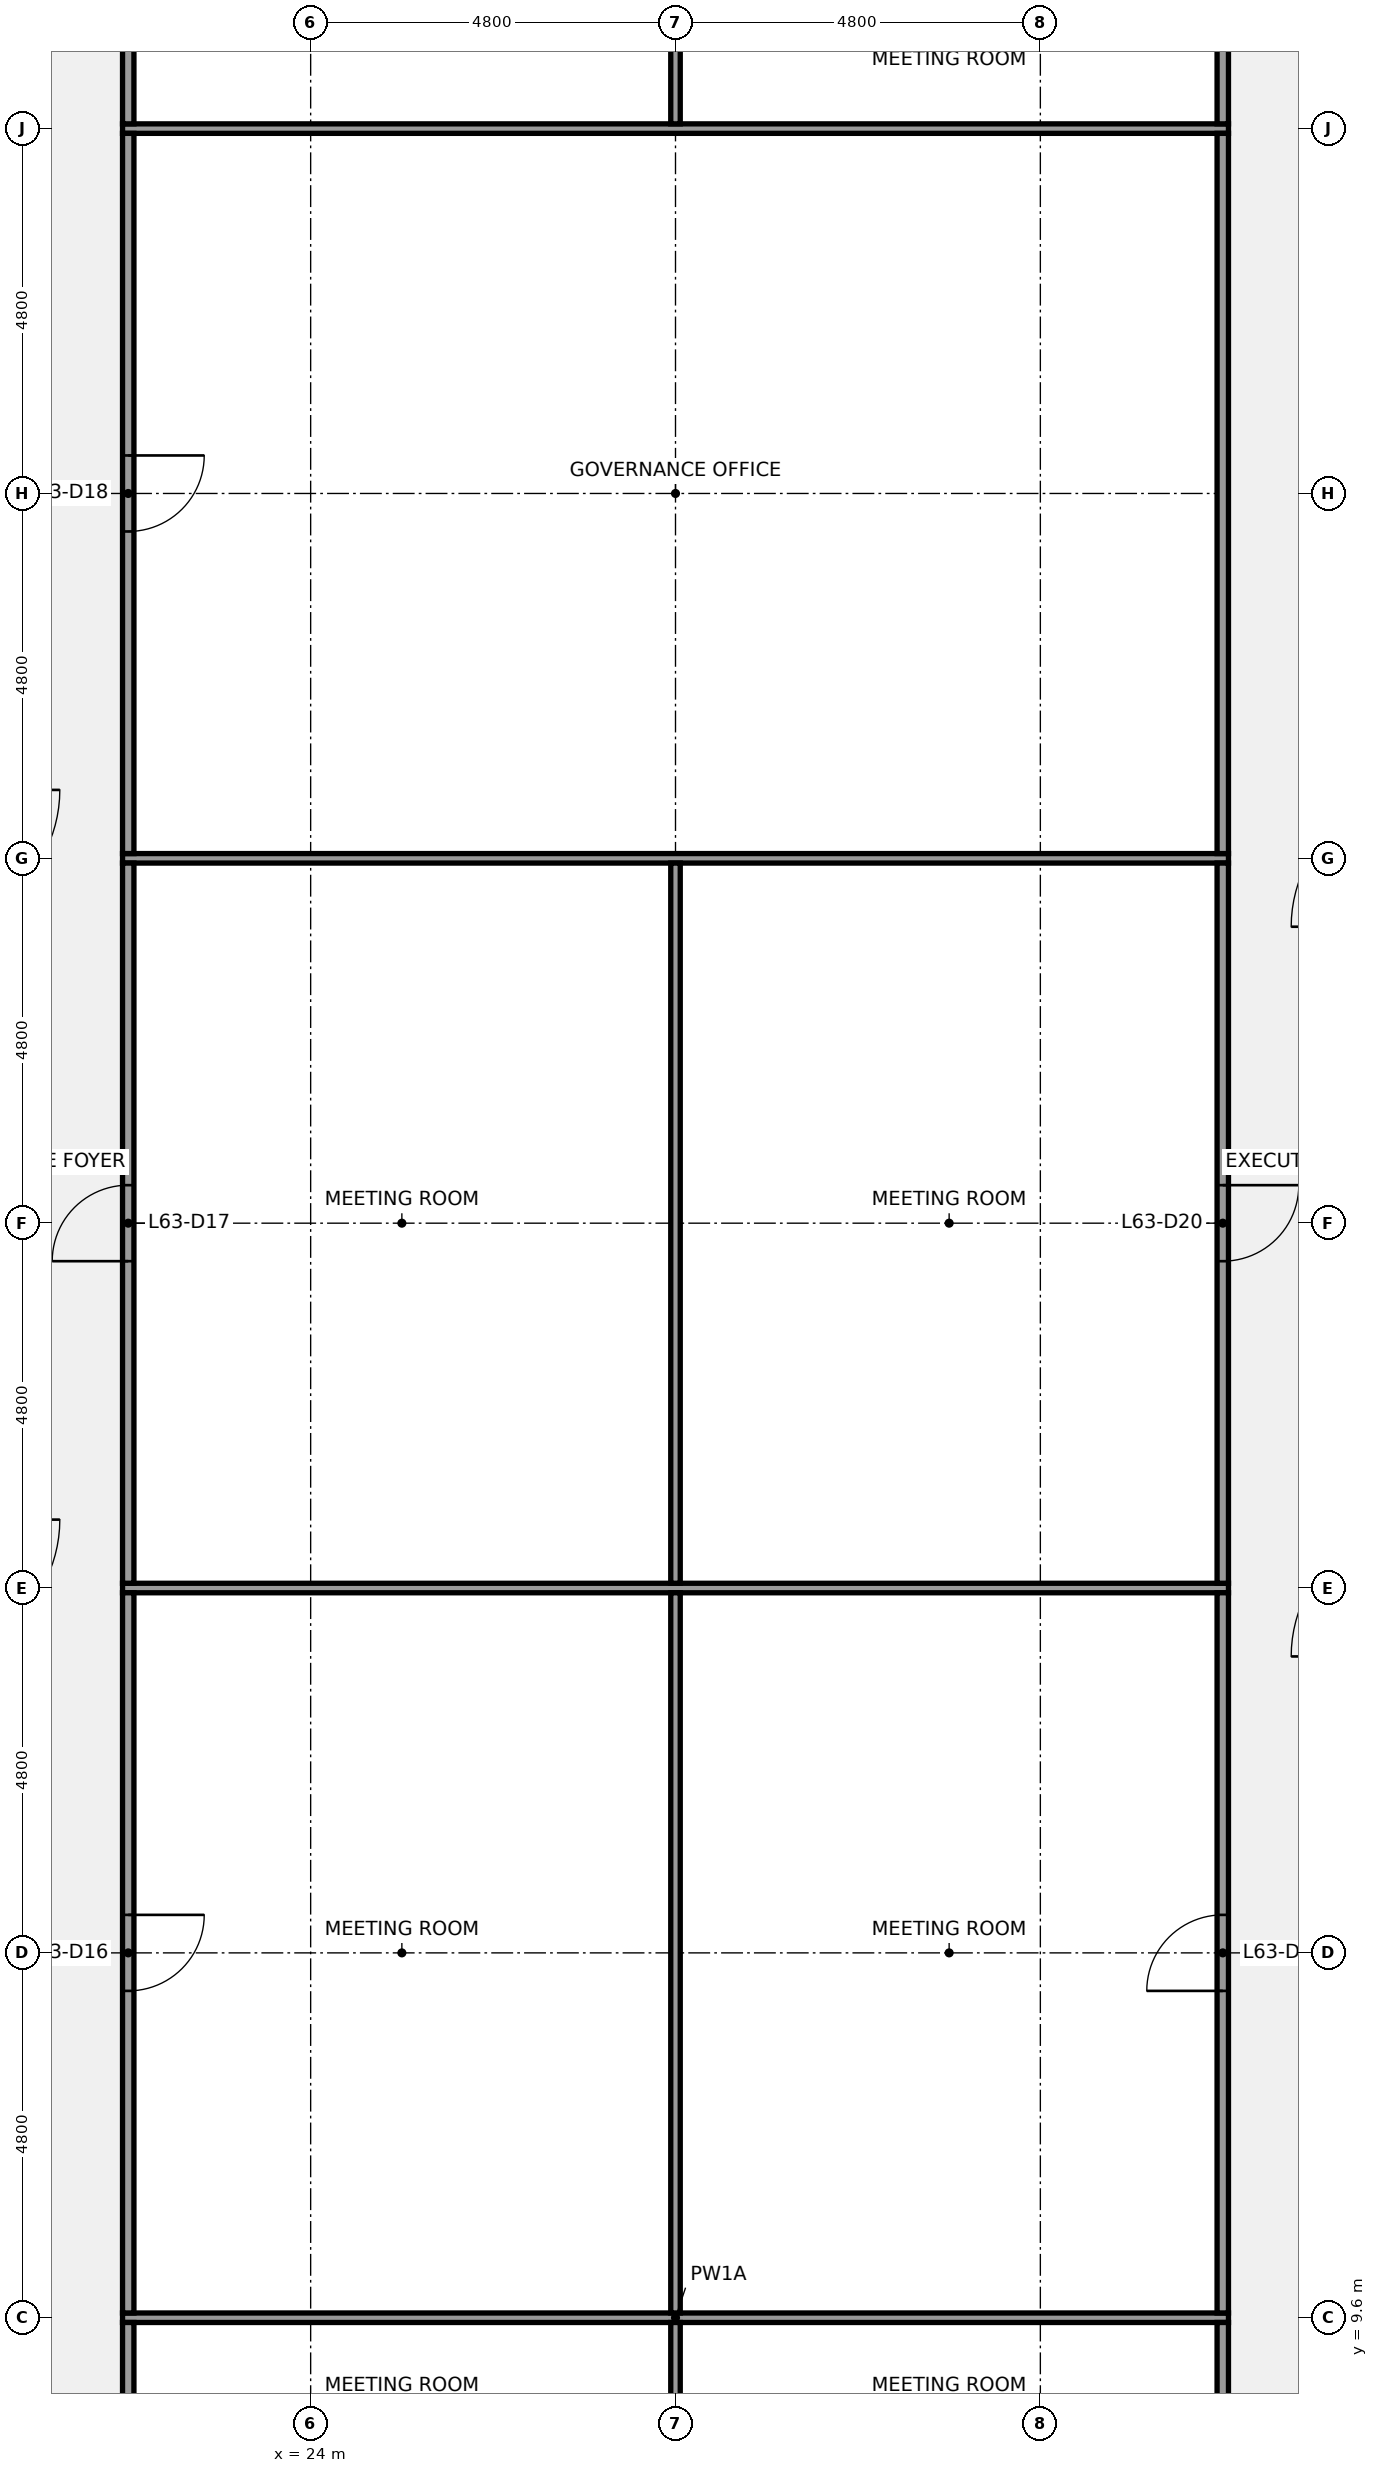
"""IFC4 building model, lengths in metres.
Left out: names, types, materials, properties, quantities, classifications, styles, units other than length and angle.
Written with IfcOpenShell. Run it as: python <this file> out.ifc"""

import sys

from ifc_helpers import new_model, si_unit, direction, frame, frame_2d, origin, place, context, subcontext, project, spatial, rectangle, extrude, element, fill, save


model = new_model("IFC4")
c1 = context("Model", 3, precision=1e-05, world=origin(), true_north=direction((0.0, 1.0)))
c2 = subcontext(c1, "Body", "Model", "MODEL_VIEW")
j1 = project(units=[si_unit("LENGTHUNIT", "METRE"), si_unit("PLANEANGLEUNIT", "RADIAN")], contexts=[c1])
p1 = place(None, origin())
s1 = spatial("IfcSite", under=j1, at=p1, CompositionType="ELEMENT")
p2 = place(p1, origin())
s2 = spatial("IfcBuilding", under=s1, at=p2, CompositionType="ELEMENT")
p3 = place(p2, frame((0.0, 0.0, 290.3)))
s3 = spatial("IfcBuildingStorey", under=s2, at=p3, CompositionType="ELEMENT", Elevation=290.3)
for number, where, z_axis, x_axis in (
    (1, (21.525, 9.6, 0.0), (0.0, 0.0, 1.0), (1.0, 0.0, 0.0)),
    (2, (21.525, 19.2, 0.0), (0.0, 0.0, 1.0), (1.0, 0.0, 0.0)),
    (3, (21.525, 28.8, 0.0), (0.0, 0.0, 1.0), (1.0, 0.0, 0.0)),
    (4, (21.525, 38.4, 0.0), (0.0, 0.0, 1.0), (1.0, 0.0, 0.0)),
):
    element("IfcWall", number, at=place(p3, frame(where, z_axis=z_axis, x_axis=x_axis)), inside=s3, PredefinedType="PARTITIONING", context=c2, shape_type="SweptSolid", body=[
        extrude(rectangle(XDim=14.55, YDim=0.125, at=frame_2d((7.275, 0.0))), origin(), (0.0, 0.0, 1.0), 2.87),
    ])
p4 = place(p3, frame((21.6, 7.275, 0.0), z_axis=(0.0, 0.0, 1.0), x_axis=(0.0, 1.0, 0.0)))
e5 = element("IfcWall", 5, at=p4, inside=s3, PredefinedType="PARTITIONING", context=c2, shape_type="SweptSolid", body=[
    extrude(rectangle(XDim=2.263, YDim=0.15, at=frame_2d((1.131, 0.0))), origin(), (0.0, 0.0, 1.0), 2.87),
])
p5 = place(p3, frame((21.6, 9.663, 0.0), z_axis=(0.0, 0.0, 1.0), x_axis=(0.0, 1.0, 0.0)))
e6 = element("IfcWall", 6, at=p5, inside=s3, PredefinedType="PARTITIONING", context=c2, shape_type="SweptSolid", body=[
    extrude(rectangle(XDim=9.475, YDim=0.15, at=frame_2d((4.737, 0.0))), origin(), (0.0, 0.0, 1.0), 2.87),
])
p6 = place(p5, frame((4.238, 0.0, 0.0)))
e7 = element("IfcOpeningElement", 7, at=p6, cuts=e6, PredefinedType="OPENING", context=c2, shape_type="SweptSolid", body=[
    extrude(rectangle(XDim=1.0, YDim=2.1, at=frame_2d((0.5, 1.05))), frame((0.0, 0.085, 0.0), z_axis=(0.0, -1.0, 0.0), x_axis=(1.0, 0.0, 0.0)), (0.0, 0.0, 1.0), 0.17),
])
p7 = place(p3, frame((21.6, 19.262, 0.0), z_axis=(0.0, 0.0, 1.0), x_axis=(0.0, 1.0, 0.0)))
e8 = element("IfcWall", 8, at=p7, inside=s3, PredefinedType="PARTITIONING", context=c2, shape_type="SweptSolid", body=[
    extrude(rectangle(XDim=9.475, YDim=0.15, at=frame_2d((4.738, 0.0))), origin(), (0.0, 0.0, 1.0), 2.87),
])
p8 = place(p7, frame((4.238, 0.0, 0.0)))
e9 = element("IfcOpeningElement", 9, at=p8, cuts=e8, PredefinedType="OPENING", context=c2, shape_type="SweptSolid", body=[
    extrude(rectangle(XDim=1.0, YDim=2.1, at=frame_2d((0.5, 1.05))), frame((0.0, 0.085, 0.0), z_axis=(0.0, -1.0, 0.0), x_axis=(1.0, 0.0, 0.0)), (0.0, 0.0, 1.0), 0.17),
])
p9 = place(p3, frame((21.6, 28.863, 0.0), z_axis=(0.0, 0.0, 1.0), x_axis=(0.0, 1.0, 0.0)))
e10 = element("IfcWall", 10, at=p9, inside=s3, PredefinedType="PARTITIONING", context=c2, shape_type="SweptSolid", body=[
    extrude(rectangle(XDim=9.475, YDim=0.15, at=frame_2d((4.737, 0.0))), origin(), (0.0, 0.0, 1.0), 2.87),
])
p10 = place(p9, frame((4.238, 0.0, 0.0)))
e11 = element("IfcOpeningElement", 11, at=p10, cuts=e10, PredefinedType="OPENING", context=c2, shape_type="SweptSolid", body=[
    extrude(rectangle(XDim=1.0, YDim=2.1, at=frame_2d((0.5, 1.05))), frame((0.0, 0.085, 0.0), z_axis=(0.0, -1.0, 0.0), x_axis=(1.0, 0.0, 0.0)), (0.0, 0.0, 1.0), 0.17),
])
p11 = place(p3, frame((21.6, 38.462, 0.0), z_axis=(0.0, 0.0, 1.0), x_axis=(0.0, 1.0, 0.0)))
e12 = element("IfcWall", 12, at=p11, inside=s3, PredefinedType="PARTITIONING", context=c2, shape_type="SweptSolid", body=[
    extrude(rectangle(XDim=2.263, YDim=0.15, at=frame_2d((1.131, 0.0))), origin(), (0.0, 0.0, 1.0), 2.87),
])
p12 = place(p3, frame((28.8, 7.275, 0.0), z_axis=(0.0, 0.0, 1.0), x_axis=(0.0, 1.0, 0.0)))
e13 = element("IfcWall", 13, at=p12, inside=s3, PredefinedType="PARTITIONING", context=c2, shape_type="SweptSolid", body=[
    extrude(rectangle(XDim=2.263, YDim=0.125, at=frame_2d((1.131, 0.0))), origin(), (0.0, 0.0, 1.0), 2.87),
])
p13 = place(p3, frame((28.8, 9.663, 0.0), z_axis=(0.0, 0.0, 1.0), x_axis=(0.0, 1.0, 0.0)))
e14 = element("IfcWall", 14, at=p13, inside=s3, PredefinedType="PARTITIONING", context=c2, shape_type="SweptSolid", body=[
    extrude(rectangle(XDim=9.475, YDim=0.125, at=frame_2d((4.737, 0.0))), origin(), (0.0, 0.0, 1.0), 2.87),
])
p14 = place(p3, frame((28.8, 19.262, 0.0), z_axis=(0.0, 0.0, 1.0), x_axis=(0.0, 1.0, 0.0)))
e15 = element("IfcWall", 15, at=p14, inside=s3, PredefinedType="PARTITIONING", context=c2, shape_type="SweptSolid", body=[
    extrude(rectangle(XDim=9.475, YDim=0.125, at=frame_2d((4.738, 0.0))), origin(), (0.0, 0.0, 1.0), 2.87),
])
p15 = place(p3, frame((28.8, 38.462, 0.0), z_axis=(0.0, 0.0, 1.0), x_axis=(0.0, 1.0, 0.0)))
e16 = element("IfcWall", 16, at=p15, inside=s3, PredefinedType="PARTITIONING", context=c2, shape_type="SweptSolid", body=[
    extrude(rectangle(XDim=2.263, YDim=0.125, at=frame_2d((1.131, 0.0))), origin(), (0.0, 0.0, 1.0), 2.87),
])
p16 = place(p3, frame((36.0, 7.275, 0.0), z_axis=(0.0, 0.0, 1.0), x_axis=(0.0, 1.0, 0.0)))
e17 = element("IfcWall", 17, at=p16, inside=s3, PredefinedType="PARTITIONING", context=c2, shape_type="SweptSolid", body=[
    extrude(rectangle(XDim=2.263, YDim=0.15, at=frame_2d((1.131, 0.0))), origin(), (0.0, 0.0, 1.0), 2.87),
])
p17 = place(p3, frame((36.0, 9.663, 0.0), z_axis=(0.0, 0.0, 1.0), x_axis=(0.0, 1.0, 0.0)))
e18 = element("IfcWall", 18, at=p17, inside=s3, PredefinedType="PARTITIONING", context=c2, shape_type="SweptSolid", body=[
    extrude(rectangle(XDim=9.475, YDim=0.15, at=frame_2d((4.737, 0.0))), origin(), (0.0, 0.0, 1.0), 2.87),
])
p18 = place(p17, frame((4.238, 0.0, 0.0)))
e19 = element("IfcOpeningElement", 19, at=p18, cuts=e18, PredefinedType="OPENING", context=c2, shape_type="SweptSolid", body=[
    extrude(rectangle(XDim=1.0, YDim=2.1, at=frame_2d((0.5, 1.05))), frame((0.0, 0.085, 0.0), z_axis=(0.0, -1.0, 0.0), x_axis=(1.0, 0.0, 0.0)), (0.0, 0.0, 1.0), 0.17),
])
p19 = place(p3, frame((36.0, 19.262, 0.0), z_axis=(0.0, 0.0, 1.0), x_axis=(0.0, 1.0, 0.0)))
e20 = element("IfcWall", 20, at=p19, inside=s3, PredefinedType="PARTITIONING", context=c2, shape_type="SweptSolid", body=[
    extrude(rectangle(XDim=9.475, YDim=0.15, at=frame_2d((4.738, 0.0))), origin(), (0.0, 0.0, 1.0), 2.87),
])
p20 = place(p19, frame((4.238, 0.0, 0.0)))
e21 = element("IfcOpeningElement", 21, at=p20, cuts=e20, PredefinedType="OPENING", context=c2, shape_type="SweptSolid", body=[
    extrude(rectangle(XDim=1.0, YDim=2.1, at=frame_2d((0.5, 1.05))), frame((0.0, 0.085, 0.0), z_axis=(0.0, -1.0, 0.0), x_axis=(1.0, 0.0, 0.0)), (0.0, 0.0, 1.0), 0.17),
])
p21 = place(p3, frame((36.0, 28.863, 0.0), z_axis=(0.0, 0.0, 1.0), x_axis=(0.0, 1.0, 0.0)))
e22 = element("IfcWall", 22, at=p21, inside=s3, PredefinedType="PARTITIONING", context=c2, shape_type="SweptSolid", body=[
    extrude(rectangle(XDim=9.475, YDim=0.15, at=frame_2d((4.737, 0.0))), origin(), (0.0, 0.0, 1.0), 2.87),
])
p22 = place(p3, frame((36.0, 38.462, 0.0), z_axis=(0.0, 0.0, 1.0), x_axis=(0.0, 1.0, 0.0)))
e23 = element("IfcWall", 23, at=p22, inside=s3, PredefinedType="PARTITIONING", context=c2, shape_type="SweptSolid", body=[
    extrude(rectangle(XDim=2.263, YDim=0.15, at=frame_2d((1.131, 0.0))), origin(), (0.0, 0.0, 1.0), 2.87),
])
p23 = place(p6, origin())
e24 = element("IfcDoor", 24, at=p23, inside=s3, OperationType="SINGLE_SWING_RIGHT", PredefinedType="DOOR", context=c2, shape_type="SweptSolid", body=[
    extrude(rectangle(XDim=1.0, YDim=2.1, at=frame_2d((0.5, 1.05))), frame((0.0, 0.025, 0.0), z_axis=(0.0, -1.0, 0.0), x_axis=(1.0, 0.0, 0.0)), (0.0, 0.0, 1.0), 0.05),
])
fill(e7, e24)
p24 = place(p8, origin())
e25 = element("IfcDoor", 25, at=p24, inside=s3, OperationType="SINGLE_SWING_LEFT", PredefinedType="DOOR", context=c2, shape_type="SweptSolid", body=[
    extrude(rectangle(XDim=1.0, YDim=2.1, at=frame_2d((0.5, 1.05))), frame((0.0, 0.025, 0.0), z_axis=(0.0, -1.0, 0.0), x_axis=(1.0, 0.0, 0.0)), (0.0, 0.0, 1.0), 0.05),
])
fill(e9, e25)
p25 = place(p10, origin())
e26 = element("IfcDoor", 26, at=p25, inside=s3, OperationType="SINGLE_SWING_RIGHT", PredefinedType="DOOR", context=c2, shape_type="SweptSolid", body=[
    extrude(rectangle(XDim=1.0, YDim=2.1, at=frame_2d((0.5, 1.05))), frame((0.0, 0.025, 0.0), z_axis=(0.0, -1.0, 0.0), x_axis=(1.0, 0.0, 0.0)), (0.0, 0.0, 1.0), 0.05),
])
fill(e11, e26)
p26 = place(p18, origin())
e27 = element("IfcDoor", 27, at=p26, inside=s3, OperationType="SINGLE_SWING_LEFT", PredefinedType="DOOR", context=c2, shape_type="SweptSolid", body=[
    extrude(rectangle(XDim=1.0, YDim=2.1, at=frame_2d((0.5, 1.05))), frame((0.0, 0.025, 0.0), z_axis=(0.0, -1.0, 0.0), x_axis=(1.0, 0.0, 0.0)), (0.0, 0.0, 1.0), 0.05),
])
fill(e19, e27)
p27 = place(p20, origin())
e28 = element("IfcDoor", 28, at=p27, inside=s3, OperationType="SINGLE_SWING_RIGHT", PredefinedType="DOOR", context=c2, shape_type="SweptSolid", body=[
    extrude(rectangle(XDim=1.0, YDim=2.1, at=frame_2d((0.5, 1.05))), frame((0.0, 0.025, 0.0), z_axis=(0.0, -1.0, 0.0), x_axis=(1.0, 0.0, 0.0)), (0.0, 0.0, 1.0), 0.05),
])
fill(e21, e28)
save(model, sys.argv[1])
